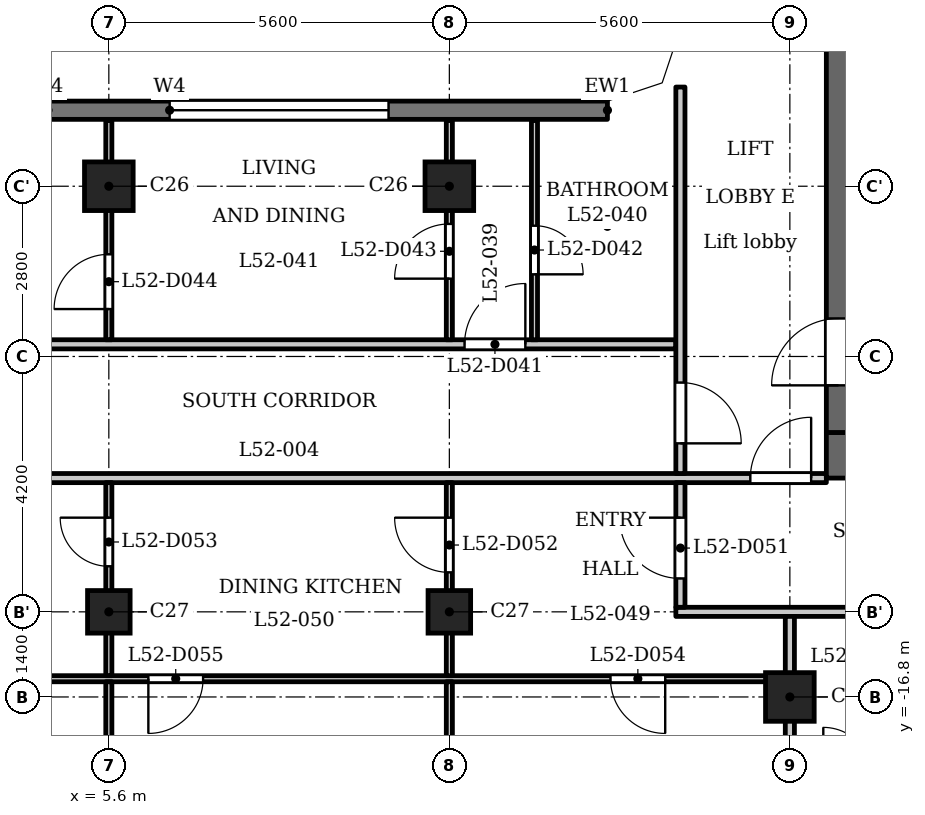
"""IFC4 building model, lengths in metres.
Left out: names, types, materials, properties, quantities, classifications, styles, units other than length and angle.
Written with IfcOpenShell. Run it as: python <this file> out.ifc"""

import sys

from ifc_helpers import new_model, si_unit, direction, frame, frame_2d, origin, origin_2d, place, context, subcontext, project, spatial, polyline, rectangle, outline, extrude, element, fill, save


model = new_model("IFC4")
c1 = context("Model", 3, precision=1e-05, world=origin(), true_north=direction((0.0, 1.0)))
c2 = subcontext(c1, "Body", "Model", "MODEL_VIEW")
j1 = project(units=[si_unit("LENGTHUNIT", "METRE"), si_unit("PLANEANGLEUNIT", "RADIAN")], contexts=[c1])
p1 = place(None, origin())
s1 = spatial("IfcSite", under=j1, at=p1, CompositionType="ELEMENT")
p2 = place(p1, origin())
s2 = spatial("IfcBuilding", under=s1, at=p2, CompositionType="ELEMENT")
p3 = place(p2, frame((0.0, 0.0, 202.9)))
s3 = spatial("IfcBuildingStorey", under=s2, at=p3, CompositionType="ELEMENT", Elevation=202.9)
for number, where, z_axis, x_axis in (
    (1, (5.6, -8.4, 0.0), (0.0, 0.0, 1.0), (1.0, 0.0, 0.0)),
    (2, (11.2, -8.4, 0.0), (0.0, 0.0, 1.0), (1.0, 0.0, 0.0)),
    (3, (16.8, -16.8, 0.0), (0.0, 0.0, 1.0), (1.0, 0.0, 0.0)),
):
    element("IfcColumn", number, at=place(p3, frame(where, z_axis=z_axis, x_axis=x_axis)), inside=s3, PredefinedType="COLUMN", context=c2, shape_type="SweptSolid", body=[
        extrude(rectangle(XDim=0.8, YDim=0.8, at=origin_2d()), origin(), (0.0, 0.0, 1.0), 3.5),
    ])
for number, where, z_axis, x_axis in (
    (4, (5.6, -15.4, 0.0), (0.0, 0.0, 1.0), (1.0, 0.0, 0.0)),
    (5, (11.2, -15.4, 0.0), (0.0, 0.0, 1.0), (1.0, 0.0, 0.0)),
):
    element("IfcColumn", number, at=place(p3, frame(where, z_axis=z_axis, x_axis=x_axis)), inside=s3, PredefinedType="COLUMN", context=c2, shape_type="SweptSolid", body=[
        extrude(rectangle(XDim=0.7, YDim=0.7, at=origin_2d()), origin(), (0.0, 0.0, 1.0), 3.5),
    ])
p4 = place(p3, frame((13.8, -7.15, 0.0), z_axis=(0.0, 0.0, 1.0), x_axis=(-1.0, 0.0, 0.0)))
e6 = element("IfcWall", 6, at=p4, inside=s3, PredefinedType="SOLIDWALL", context=c2, shape_type="SweptSolid", body=[
    extrude(rectangle(XDim=27.6, YDim=0.3, at=frame_2d((13.8, 0.0))), origin(), (0.0, 0.0, 1.0), 3.2),
])
p5 = place(p4, frame((3.6, 0.0, 1.2)))
e7 = element("IfcOpeningElement", 7, at=p5, cuts=e6, PredefinedType="OPENING", context=c2, shape_type="SweptSolid", body=[
    extrude(rectangle(XDim=3.6, YDim=0.95, at=frame_2d((1.8, 0.475))), frame((0.0, 0.16, 0.0), z_axis=(0.0, -1.0, 0.0), x_axis=(1.0, 0.0, 0.0)), (0.0, 0.0, 1.0), 0.32),
])
p6 = place(p4, frame((9.2, 0.0, 1.2)))
e8 = element("IfcOpeningElement", 8, at=p6, cuts=e6, PredefinedType="OPENING", context=c2, shape_type="SweptSolid", body=[
    extrude(rectangle(XDim=3.6, YDim=0.95, at=frame_2d((1.8, 0.475))), frame((0.0, 0.16, 0.0), z_axis=(0.0, -1.0, 0.0), x_axis=(1.0, 0.0, 0.0)), (0.0, 0.0, 1.0), 0.32),
])
p7 = place(p4, frame((14.8, 0.0, 1.2)))
e9 = element("IfcOpeningElement", 9, at=p7, cuts=e6, PredefinedType="OPENING", context=c2, shape_type="SweptSolid", body=[
    extrude(rectangle(XDim=3.6, YDim=0.95, at=frame_2d((1.8, 0.475))), frame((0.0, 0.16, 0.0), z_axis=(0.0, -1.0, 0.0), x_axis=(1.0, 0.0, 0.0)), (0.0, 0.0, 1.0), 0.32),
])
p8 = place(p4, frame((20.4, 0.0, 1.2)))
e10 = element("IfcOpeningElement", 10, at=p8, cuts=e6, PredefinedType="OPENING", context=c2, shape_type="SweptSolid", body=[
    extrude(rectangle(XDim=3.6, YDim=0.95, at=frame_2d((1.8, 0.475))), frame((0.0, 0.16, 0.0), z_axis=(0.0, -1.0, 0.0), x_axis=(1.0, 0.0, 0.0)), (0.0, 0.0, 1.0), 0.32),
])
p9 = place(p3, frame((17.4, -12.825, 0.0), z_axis=(0.0, 0.0, 1.0), x_axis=(1.0, 0.0, 0.0)))
e11 = element("IfcWall", 11, at=p9, inside=s3, PredefinedType="SHEAR", context=c2, shape_type="SweptSolid", body=[
    extrude(rectangle(XDim=7.6, YDim=0.75, at=frame_2d((3.8, 0.0))), origin(), (0.0, 0.0, 1.0), 3.2),
])
p10 = place(p3, frame((17.6, -12.45, 0.0), z_axis=(0.0, 0.0, 1.0), x_axis=(0.0, 1.0, 0.0)))
e12 = element("IfcWall", 12, at=p10, inside=s3, PredefinedType="SHEAR", context=c2, shape_type="SweptSolid", body=[
    extrude(rectangle(XDim=24.9, YDim=0.4, at=frame_2d((12.45, 0.0))), origin(), (0.0, 0.0, 1.0), 3.2),
])
p11 = place(p10, frame((8.65, 0.0, 0.0)))
e13 = element("IfcOpeningElement", 13, at=p11, cuts=e12, PredefinedType="OPENING", context=c2, shape_type="SweptSolid", body=[
    extrude(rectangle(XDim=0.9, YDim=2.1, at=frame_2d((0.45, 1.05))), frame((0.0, 0.21, 0.0), z_axis=(0.0, -1.0, 0.0), x_axis=(1.0, 0.0, 0.0)), (0.0, 0.0, 1.0), 0.42),
])
p12 = place(p10, frame((15.6, 0.0, 0.0)))
e14 = element("IfcOpeningElement", 14, at=p12, cuts=e12, PredefinedType="OPENING", context=c2, shape_type="SweptSolid", body=[
    extrude(rectangle(XDim=1.1, YDim=2.1, at=frame_2d((0.55, 1.05))), frame((0.0, 0.21, 0.0), z_axis=(0.0, -1.0, 0.0), x_axis=(1.0, 0.0, 0.0)), (0.0, 0.0, 1.0), 0.42),
])
p13 = place(p10, frame((18.0, 0.0, 0.0)))
e15 = element("IfcOpeningElement", 15, at=p13, cuts=e12, PredefinedType="OPENING", context=c2, shape_type="SweptSolid", body=[
    extrude(rectangle(XDim=1.1, YDim=2.1, at=frame_2d((0.55, 1.05))), frame((0.0, 0.21, 0.0), z_axis=(0.0, -1.0, 0.0), x_axis=(1.0, 0.0, 0.0)), (0.0, 0.0, 1.0), 0.42),
])
p14 = place(p10, frame((23.025, 0.0, 0.0)))
e16 = element("IfcOpeningElement", 16, at=p14, cuts=e12, PredefinedType="OPENING", context=c2, shape_type="SweptSolid", body=[
    extrude(rectangle(XDim=1.1, YDim=2.1, at=frame_2d((0.55, 1.05))), frame((0.0, 0.21, 0.0), z_axis=(0.0, -1.0, 0.0), x_axis=(1.0, 0.0, 0.0)), (0.0, 0.0, 1.0), 0.42),
])
p15 = place(p10, frame((0.775, 0.0, 0.0)))
e17 = element("IfcOpeningElement", 17, at=p15, cuts=e12, PredefinedType="OPENING", context=c2, shape_type="SweptSolid", body=[
    extrude(rectangle(XDim=1.1, YDim=2.1, at=frame_2d((0.55, 1.05))), frame((0.0, 0.21, 0.0), z_axis=(0.0, -1.0, 0.0), x_axis=(1.0, 0.0, 0.0)), (0.0, 0.0, 1.0), 0.42),
])
p16 = place(p10, frame((12.925, 0.0, 0.0)))
e18 = element("IfcOpeningElement", 18, at=p16, cuts=e12, PredefinedType="OPENING", context=c2, shape_type="SweptSolid", body=[
    extrude(rectangle(XDim=1.8, YDim=2.1, at=frame_2d((0.9, 1.05))), frame((0.0, 0.21, 0.0), z_axis=(0.0, -1.0, 0.0), x_axis=(1.0, 0.0, 0.0)), (0.0, 0.0, 1.0), 0.42),
])
p17 = place(p3, frame((-16.725, -16.5, 0.0), z_axis=(0.0, 0.0, 1.0), x_axis=(1.0, 0.0, 0.0)))
e19 = element("IfcWall", 19, at=p17, inside=s3, PredefinedType="PARTITIONING", context=c2, shape_type="SweptSolid", body=[
    extrude(rectangle(XDim=33.45, YDim=0.1, at=frame_2d((16.725, 0.0))), origin(), (0.0, 0.0, 1.0), 3.2),
])
p18 = place(p17, frame((4.075, 0.0, 0.0)))
e20 = element("IfcOpeningElement", 20, at=p18, cuts=e19, PredefinedType="OPENING", context=c2, shape_type="SweptSolid", body=[
    extrude(rectangle(XDim=0.9, YDim=2.1, at=frame_2d((0.45, 1.05))), frame((0.0, 0.06, 0.0), z_axis=(0.0, -1.0, 0.0), x_axis=(1.0, 0.0, 0.0)), (0.0, 0.0, 1.0), 0.12),
])
p19 = place(p17, frame((6.175, 0.0, 0.0)))
e21 = element("IfcOpeningElement", 21, at=p19, cuts=e19, PredefinedType="OPENING", context=c2, shape_type="SweptSolid", body=[
    extrude(rectangle(XDim=0.9, YDim=2.1, at=frame_2d((0.45, 1.05))), frame((0.0, 0.06, 0.0), z_axis=(0.0, -1.0, 0.0), x_axis=(1.0, 0.0, 0.0)), (0.0, 0.0, 1.0), 0.12),
])
p20 = place(p17, frame((30.575, 0.0, 0.0)))
e22 = element("IfcOpeningElement", 22, at=p20, cuts=e19, PredefinedType="OPENING", context=c2, shape_type="SweptSolid", body=[
    extrude(rectangle(XDim=0.9, YDim=2.1, at=frame_2d((0.45, 1.05))), frame((0.0, 0.06, 0.0), z_axis=(0.0, -1.0, 0.0), x_axis=(1.0, 0.0, 0.0)), (0.0, 0.0, 1.0), 0.12),
])
p21 = place(p17, frame((22.975, 0.0, 0.0)))
e23 = element("IfcOpeningElement", 23, at=p21, cuts=e19, PredefinedType="OPENING", context=c2, shape_type="SweptSolid", body=[
    extrude(rectangle(XDim=0.9, YDim=2.1, at=frame_2d((0.45, 1.05))), frame((0.0, 0.06, 0.0), z_axis=(0.0, -1.0, 0.0), x_axis=(1.0, 0.0, 0.0)), (0.0, 0.0, 1.0), 0.12),
])
p22 = place(p3, frame((14.925, -15.4, 0.0), z_axis=(0.0, 0.0, 1.0), x_axis=(1.0, 0.0, 0.0)))
e24 = element("IfcWall", 24, at=p22, inside=s3, PredefinedType="PARTITIONING", context=c2, shape_type="SweptSolid", body=[
    extrude(rectangle(XDim=9.759, YDim=0.15, at=frame_2d((4.879, 0.0))), origin(), (0.0, 0.0, 1.0), 3.2),
])
p23 = place(p22, frame((4.525, 0.0, 0.0)))
e25 = element("IfcOpeningElement", 25, at=p23, cuts=e24, PredefinedType="OPENING", context=c2, shape_type="SweptSolid", body=[
    extrude(rectangle(XDim=1.0, YDim=2.1, at=frame_2d((0.5, 1.05))), frame((0.0, 0.085, 0.0), z_axis=(0.0, -1.0, 0.0), x_axis=(1.0, 0.0, 0.0)), (0.0, 0.0, 1.0), 0.17),
])
p24 = place(p3, frame((-17.4, -13.2, 0.0), z_axis=(0.0, 0.0, 1.0), x_axis=(1.0, 0.0, 0.0)))
e26 = element("IfcWall", 26, at=p24, inside=s3, PredefinedType="PARTITIONING", context=c2, shape_type="SweptSolid", body=[
    extrude(rectangle(XDim=34.8, YDim=0.15, at=frame_2d((17.4, 0.0))), origin(), (0.0, 0.0, 1.0), 3.2),
])
p25 = place(p24, frame((0.15, 0.0, 0.0)))
e27 = element("IfcOpeningElement", 27, at=p25, cuts=e26, PredefinedType="OPENING", context=c2, shape_type="SweptSolid", body=[
    extrude(rectangle(XDim=1.0, YDim=2.1, at=frame_2d((0.5, 1.05))), frame((0.0, 0.085, 0.0), z_axis=(0.0, -1.0, 0.0), x_axis=(1.0, 0.0, 0.0)), (0.0, 0.0, 1.0), 0.17),
])
p26 = place(p24, frame((33.55, 0.0, 0.0)))
e28 = element("IfcOpeningElement", 28, at=p26, cuts=e26, PredefinedType="OPENING", context=c2, shape_type="SweptSolid", body=[
    extrude(rectangle(XDim=1.0, YDim=2.1, at=frame_2d((0.5, 1.05))), frame((0.0, 0.085, 0.0), z_axis=(0.0, -1.0, 0.0), x_axis=(1.0, 0.0, 0.0)), (0.0, 0.0, 1.0), 0.17),
])
p27 = place(p3, frame((-14.925, -11.0, 0.0), z_axis=(0.0, 0.0, 1.0), x_axis=(1.0, 0.0, 0.0)))
e29 = element("IfcWall", 29, at=p27, inside=s3, PredefinedType="PARTITIONING", context=c2, shape_type="SweptSolid", body=[
    extrude(rectangle(XDim=29.85, YDim=0.15, at=frame_2d((14.925, 0.0))), origin(), (0.0, 0.0, 1.0), 3.2),
])
p28 = place(p27, frame((2.575, 0.0, 0.0)))
e30 = element("IfcOpeningElement", 30, at=p28, cuts=e29, PredefinedType="OPENING", context=c2, shape_type="SweptSolid", body=[
    extrude(rectangle(XDim=1.0, YDim=2.1, at=frame_2d((0.5, 1.05))), frame((0.0, 0.085, 0.0), z_axis=(0.0, -1.0, 0.0), x_axis=(1.0, 0.0, 0.0)), (0.0, 0.0, 1.0), 0.17),
])
p29 = place(p27, frame((26.375, 0.0, 0.0)))
e31 = element("IfcOpeningElement", 31, at=p29, cuts=e29, PredefinedType="OPENING", context=c2, shape_type="SweptSolid", body=[
    extrude(rectangle(XDim=1.0, YDim=2.1, at=frame_2d((0.5, 1.05))), frame((0.0, 0.085, 0.0), z_axis=(0.0, -1.0, 0.0), x_axis=(1.0, 0.0, 0.0)), (0.0, 0.0, 1.0), 0.17),
])
p30 = place(p3, frame((5.6, -22.08, 0.0), z_axis=(0.0, 0.0, 1.0), x_axis=(0.0, 1.0, 0.0)))
e32 = element("IfcWall", 32, at=p30, inside=s3, PredefinedType="PARTITIONING", context=c2, shape_type="SweptSolid", body=[
    extrude(rectangle(XDim=5.53, YDim=0.1, at=frame_2d((2.765, 0.0))), origin(), (0.0, 0.0, 1.0), 3.2),
])
p31 = place(p30, frame((0.28, 0.0, 0.0)))
e33 = element("IfcOpeningElement", 33, at=p31, cuts=e32, PredefinedType="OPENING", context=c2, shape_type="SweptSolid", body=[
    extrude(rectangle(XDim=0.9, YDim=2.1, at=frame_2d((0.45, 1.05))), frame((0.0, 0.06, 0.0), z_axis=(0.0, -1.0, 0.0), x_axis=(1.0, 0.0, 0.0)), (0.0, 0.0, 1.0), 0.12),
])
p32 = place(p3, frame((5.6, -16.45, 0.0), z_axis=(0.0, 0.0, 1.0), x_axis=(0.0, 1.0, 0.0)))
e34 = element("IfcWall", 34, at=p32, inside=s3, PredefinedType="PARTITIONING", context=c2, shape_type="SweptSolid", body=[
    extrude(rectangle(XDim=3.175, YDim=0.1, at=frame_2d((1.587, 0.0))), origin(), (0.0, 0.0, 1.0), 3.2),
])
p33 = place(p32, frame((1.799, 0.0, 0.0)))
e35 = element("IfcOpeningElement", 35, at=p33, cuts=e34, PredefinedType="OPENING", context=c2, shape_type="SweptSolid", body=[
    extrude(rectangle(XDim=0.8, YDim=2.1, at=frame_2d((0.4, 1.05))), frame((0.0, 0.06, 0.0), z_axis=(0.0, -1.0, 0.0), x_axis=(1.0, 0.0, 0.0)), (0.0, 0.0, 1.0), 0.12),
])
p34 = place(p3, frame((5.6, -10.925, 0.0), z_axis=(0.0, 0.0, 1.0), x_axis=(0.0, 1.0, 0.0)))
e36 = element("IfcWall", 36, at=p34, inside=s3, PredefinedType="PARTITIONING", context=c2, shape_type="SweptSolid", body=[
    extrude(rectangle(XDim=3.605, YDim=0.1, at=frame_2d((1.802, 0.0))), origin(), (0.0, 0.0, 1.0), 3.2),
])
p35 = place(p34, frame((0.505, 0.0, 0.0)))
e37 = element("IfcOpeningElement", 37, at=p35, cuts=e36, PredefinedType="OPENING", context=c2, shape_type="SweptSolid", body=[
    extrude(rectangle(XDim=0.9, YDim=2.1, at=frame_2d((0.45, 1.05))), frame((0.0, 0.06, 0.0), z_axis=(0.0, -1.0, 0.0), x_axis=(1.0, 0.0, 0.0)), (0.0, 0.0, 1.0), 0.12),
])
p36 = place(p3, frame((11.2, -22.08, 0.0), z_axis=(0.0, 0.0, 1.0), x_axis=(0.0, 1.0, 0.0)))
e38 = element("IfcWall", 38, at=p36, inside=s3, PredefinedType="PARTITIONING", context=c2, shape_type="SweptSolid", body=[
    extrude(rectangle(XDim=5.53, YDim=0.1, at=frame_2d((2.765, 0.0))), origin(), (0.0, 0.0, 1.0), 3.2),
])
p37 = place(p3, frame((11.2, -16.45, 0.0), z_axis=(0.0, 0.0, 1.0), x_axis=(0.0, 1.0, 0.0)))
e39 = element("IfcWall", 39, at=p37, inside=s3, PredefinedType="PARTITIONING", context=c2, shape_type="SweptSolid", body=[
    extrude(rectangle(XDim=3.175, YDim=0.1, at=frame_2d((1.587, 0.0))), origin(), (0.0, 0.0, 1.0), 3.2),
])
p38 = place(p37, frame((1.699, 0.0, 0.0)))
e40 = element("IfcOpeningElement", 40, at=p38, cuts=e39, PredefinedType="OPENING", context=c2, shape_type="SweptSolid", body=[
    extrude(rectangle(XDim=0.9, YDim=2.1, at=frame_2d((0.45, 1.05))), frame((0.0, 0.06, 0.0), z_axis=(0.0, -1.0, 0.0), x_axis=(1.0, 0.0, 0.0)), (0.0, 0.0, 1.0), 0.12),
])
p39 = place(p3, frame((11.2, -10.925, 0.0), z_axis=(0.0, 0.0, 1.0), x_axis=(0.0, 1.0, 0.0)))
e41 = element("IfcWall", 41, at=p39, inside=s3, PredefinedType="PARTITIONING", context=c2, shape_type="SweptSolid", body=[
    extrude(rectangle(XDim=3.605, YDim=0.1, at=frame_2d((1.802, 0.0))), origin(), (0.0, 0.0, 1.0), 3.2),
])
p40 = place(p39, frame((1.005, 0.0, 0.0)))
e42 = element("IfcOpeningElement", 42, at=p40, cuts=e41, PredefinedType="OPENING", context=c2, shape_type="SweptSolid", body=[
    extrude(rectangle(XDim=0.9, YDim=2.1, at=frame_2d((0.45, 1.05))), frame((0.0, 0.06, 0.0), z_axis=(0.0, -1.0, 0.0), x_axis=(1.0, 0.0, 0.0)), (0.0, 0.0, 1.0), 0.12),
])
p41 = place(p3, frame((12.6, -10.925, 0.0), z_axis=(0.0, 0.0, 1.0), x_axis=(0.0, 1.0, 0.0)))
e43 = element("IfcWall", 43, at=p41, inside=s3, PredefinedType="PARTITIONING", context=c2, shape_type="SweptSolid", body=[
    extrude(rectangle(XDim=3.605, YDim=0.1, at=frame_2d((1.802, 0.0))), origin(), (0.0, 0.0, 1.0), 3.2),
])
p42 = place(p41, frame((1.076, 0.0, 0.0)))
e44 = element("IfcOpeningElement", 44, at=p42, cuts=e43, PredefinedType="OPENING", context=c2, shape_type="SweptSolid", body=[
    extrude(rectangle(XDim=0.8, YDim=2.1, at=frame_2d((0.4, 1.05))), frame((0.0, 0.06, 0.0), z_axis=(0.0, -1.0, 0.0), x_axis=(1.0, 0.0, 0.0)), (0.0, 0.0, 1.0), 0.12),
])
p43 = place(p3, frame((15.0, -15.325, 0.0), z_axis=(0.0, 0.0, 1.0), x_axis=(0.0, 1.0, 0.0)))
e45 = element("IfcWall", 45, at=p43, inside=s3, PredefinedType="PARTITIONING", context=c2, shape_type="SweptSolid", body=[
    extrude(rectangle(XDim=2.05, YDim=0.15, at=frame_2d((1.025, 0.0))), origin(), (0.0, 0.0, 1.0), 3.2),
])
p44 = place(p43, frame((0.474, 0.0, 0.0)))
e46 = element("IfcOpeningElement", 46, at=p44, cuts=e45, PredefinedType="OPENING", context=c2, shape_type="SweptSolid", body=[
    extrude(rectangle(XDim=1.0, YDim=2.1, at=frame_2d((0.5, 1.05))), frame((0.0, 0.085, 0.0), z_axis=(0.0, -1.0, 0.0), x_axis=(1.0, 0.0, 0.0)), (0.0, 0.0, 1.0), 0.17),
])
p45 = place(p3, frame((15.0, -13.125, 0.0), z_axis=(0.0, 0.0, 1.0), x_axis=(0.0, 1.0, 0.0)))
e47 = element("IfcWall", 47, at=p45, inside=s3, PredefinedType="PARTITIONING", context=c2, shape_type="SweptSolid", body=[
    extrude(rectangle(XDim=6.356, YDim=0.15, at=frame_2d((3.178, 0.0))), origin(), (0.0, 0.0, 1.0), 3.2),
])
p46 = place(p45, frame((0.496, 0.0, 0.0)))
e48 = element("IfcOpeningElement", 48, at=p46, cuts=e47, PredefinedType="OPENING", context=c2, shape_type="SweptSolid", body=[
    extrude(rectangle(XDim=1.0, YDim=2.1, at=frame_2d((0.5, 1.05))), frame((0.0, 0.085, 0.0), z_axis=(0.0, -1.0, 0.0), x_axis=(1.0, 0.0, 0.0)), (0.0, 0.0, 1.0), 0.17),
])
p47 = place(p3, frame((16.8, -22.31, 0.0), z_axis=(0.0, 0.0, 1.0), x_axis=(0.0, 1.0, 0.0)))
e49 = element("IfcWall", 49, at=p47, inside=s3, PredefinedType="PARTITIONING", context=c2, shape_type="SweptSolid", body=[
    extrude(rectangle(XDim=6.835, YDim=0.15, at=frame_2d((3.417, 0.0))), origin(), (0.0, 0.0, 1.0), 2.55),
])
p48 = place(p3, origin())
e50 = element("IfcWall", 50, at=p48, inside=s3, PredefinedType="SOLIDWALL", context=c2, shape_type="SweptSolid", body=[
    extrude(outline(polyline([(14.937, -6.937), (15.3, -5.849), (15.3, -5.8), (15.0, -5.8), (14.7, -6.7), (13.8, -7.0), (13.8, -7.3), (13.849, -7.3), (14.937, -6.937)])), origin(), (0.0, 0.0, 1.0), 3.2),
])
p49 = place(p15, origin())
e51 = element("IfcDoor", 51, at=p49, inside=s3, OperationType="SINGLE_SWING_RIGHT", PredefinedType="DOOR", context=c2, shape_type="SweptSolid", body=[
    extrude(rectangle(XDim=1.1, YDim=2.1, at=frame_2d((0.55, 1.05))), frame((0.0, 0.025, 0.0), z_axis=(0.0, -1.0, 0.0), x_axis=(1.0, 0.0, 0.0)), (0.0, 0.0, 1.0), 0.05),
])
fill(e17, e51)
p50 = place(p46, origin())
e52 = element("IfcDoor", 52, at=p50, inside=s3, OperationType="SINGLE_SWING_LEFT", PredefinedType="DOOR", context=c2, shape_type="SweptSolid", body=[
    extrude(rectangle(XDim=1.0, YDim=2.1, at=frame_2d((0.5, 1.05))), frame((0.0, 0.025, 0.0), z_axis=(0.0, -1.0, 0.0), x_axis=(1.0, 0.0, 0.0)), (0.0, 0.0, 1.0), 0.05),
])
fill(e48, e52)
p51 = place(p26, origin())
e53 = element("IfcDoor", 53, at=p51, inside=s3, OperationType="SINGLE_SWING_LEFT", PredefinedType="DOOR", context=c2, shape_type="SweptSolid", body=[
    extrude(rectangle(XDim=1.0, YDim=2.1, at=frame_2d((0.5, 1.05))), frame((0.0, 0.025, 0.0), z_axis=(0.0, -1.0, 0.0), x_axis=(1.0, 0.0, 0.0)), (0.0, 0.0, 1.0), 0.05),
])
fill(e28, e53)
p52 = place(p29, origin())
e54 = element("IfcDoor", 54, at=p52, inside=s3, OperationType="SINGLE_SWING_LEFT", PredefinedType="DOOR", context=c2, shape_type="SweptSolid", body=[
    extrude(rectangle(XDim=1.0, YDim=2.1, at=frame_2d((0.5, 1.05))), frame((0.0, 0.025, 0.0), z_axis=(0.0, -1.0, 0.0), x_axis=(1.0, 0.0, 0.0)), (0.0, 0.0, 1.0), 0.05),
])
fill(e31, e54)
p53 = place(p42, origin())
e55 = element("IfcDoor", 55, at=p53, inside=s3, OperationType="SINGLE_SWING_LEFT", PredefinedType="DOOR", context=c2, shape_type="SweptSolid", body=[
    extrude(rectangle(XDim=0.8, YDim=2.1, at=frame_2d((0.4, 1.05))), frame((0.0, 0.025, 0.0), z_axis=(0.0, -1.0, 0.0), x_axis=(1.0, 0.0, 0.0)), (0.0, 0.0, 1.0), 0.05),
])
fill(e44, e55)
p54 = place(p40, origin())
e56 = element("IfcDoor", 56, at=p54, inside=s3, OperationType="SINGLE_SWING_RIGHT", PredefinedType="DOOR", context=c2, shape_type="SweptSolid", body=[
    extrude(rectangle(XDim=0.9, YDim=2.1, at=frame_2d((0.45, 1.05))), frame((0.0, 0.025, 0.0), z_axis=(0.0, -1.0, 0.0), x_axis=(1.0, 0.0, 0.0)), (0.0, 0.0, 1.0), 0.05),
])
fill(e42, e56)
p55 = place(p35, origin())
e57 = element("IfcDoor", 57, at=p55, inside=s3, OperationType="SINGLE_SWING_RIGHT", PredefinedType="DOOR", context=c2, shape_type="SweptSolid", body=[
    extrude(rectangle(XDim=0.9, YDim=2.1, at=frame_2d((0.45, 1.05))), frame((0.0, 0.025, 0.0), z_axis=(0.0, -1.0, 0.0), x_axis=(1.0, 0.0, 0.0)), (0.0, 0.0, 1.0), 0.05),
])
fill(e37, e57)
p56 = place(p44, origin())
e58 = element("IfcDoor", 58, at=p56, inside=s3, OperationType="SINGLE_SWING_LEFT", PredefinedType="DOOR", context=c2, shape_type="SweptSolid", body=[
    extrude(rectangle(XDim=1.0, YDim=2.1, at=frame_2d((0.5, 1.05))), frame((0.0, 0.025, 0.0), z_axis=(0.0, -1.0, 0.0), x_axis=(1.0, 0.0, 0.0)), (0.0, 0.0, 1.0), 0.05),
])
fill(e46, e58)
p57 = place(p38, origin())
e59 = element("IfcDoor", 59, at=p57, inside=s3, OperationType="SINGLE_SWING_LEFT", PredefinedType="DOOR", context=c2, shape_type="SweptSolid", body=[
    extrude(rectangle(XDim=0.9, YDim=2.1, at=frame_2d((0.45, 1.05))), frame((0.0, 0.025, 0.0), z_axis=(0.0, -1.0, 0.0), x_axis=(1.0, 0.0, 0.0)), (0.0, 0.0, 1.0), 0.05),
])
fill(e40, e59)
p58 = place(p33, origin())
e60 = element("IfcDoor", 60, at=p58, inside=s3, OperationType="SINGLE_SWING_LEFT", PredefinedType="DOOR", context=c2, shape_type="SweptSolid", body=[
    extrude(rectangle(XDim=0.8, YDim=2.1, at=frame_2d((0.4, 1.05))), frame((0.0, 0.025, 0.0), z_axis=(0.0, -1.0, 0.0), x_axis=(1.0, 0.0, 0.0)), (0.0, 0.0, 1.0), 0.05),
])
fill(e35, e60)
p59 = place(p20, origin())
e61 = element("IfcDoor", 61, at=p59, inside=s3, OperationType="SINGLE_SWING_RIGHT", PredefinedType="DOOR", context=c2, shape_type="SweptSolid", body=[
    extrude(rectangle(XDim=0.9, YDim=2.1, at=frame_2d((0.45, 1.05))), frame((0.0, 0.025, 0.0), z_axis=(0.0, -1.0, 0.0), x_axis=(1.0, 0.0, 0.0)), (0.0, 0.0, 1.0), 0.05),
])
fill(e22, e61)
p60 = place(p21, origin())
e62 = element("IfcDoor", 62, at=p60, inside=s3, OperationType="SINGLE_SWING_LEFT", PredefinedType="DOOR", context=c2, shape_type="SweptSolid", body=[
    extrude(rectangle(XDim=0.9, YDim=2.1, at=frame_2d((0.45, 1.05))), frame((0.0, 0.025, 0.0), z_axis=(0.0, -1.0, 0.0), x_axis=(1.0, 0.0, 0.0)), (0.0, 0.0, 1.0), 0.05),
])
fill(e23, e62)
p61 = place(p5, origin())
e63 = element("IfcWindow", 63, at=p61, inside=s3, PartitioningType="SINGLE_PANEL", PredefinedType="WINDOW", context=c2, shape_type="SweptSolid", body=[
    extrude(rectangle(XDim=3.6, YDim=0.95, at=frame_2d((1.8, 0.475))), frame((0.0, 0.03, 0.0), z_axis=(0.0, -1.0, 0.0), x_axis=(1.0, 0.0, 0.0)), (0.0, 0.0, 1.0), 0.06),
])
fill(e7, e63)
save(model, sys.argv[1])
